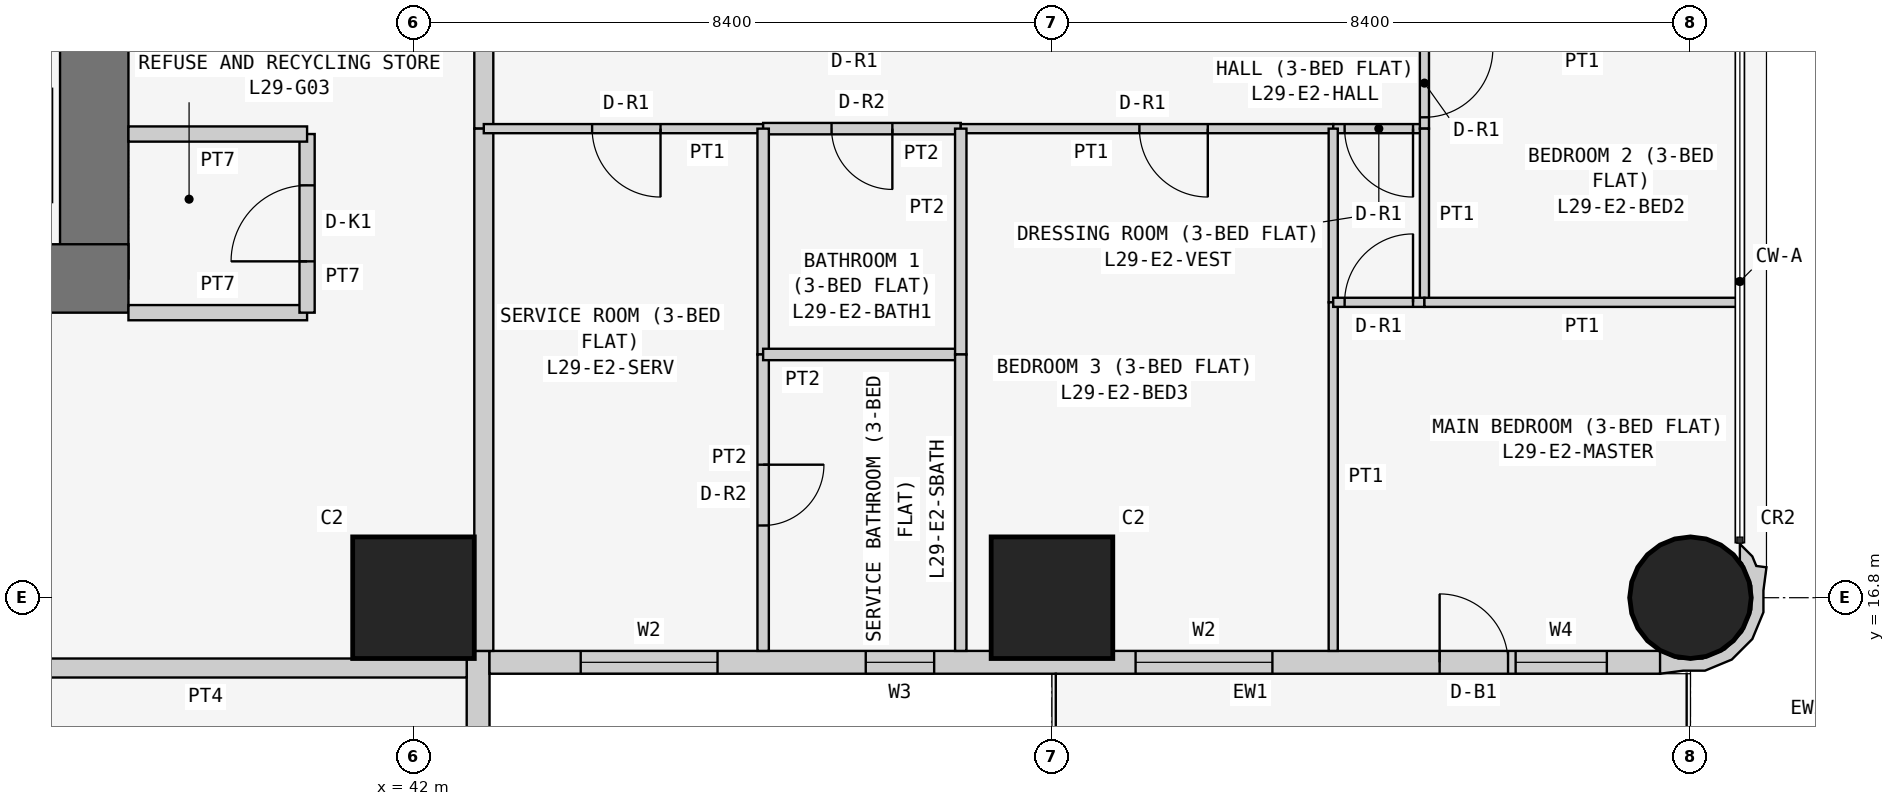
"""IFC4 building model, lengths in metres.
Left out: names, types, materials, properties, quantities, classifications, styles, units other than length and angle.
Written with IfcOpenShell. Run it as: python <this file> out.ifc"""

import sys

from ifc_helpers import new_model, si_unit, direction, frame, frame_2d, origin, origin_2d, place, context, subcontext, project, spatial, polyline, rectangle, circle, outline, extrude, element, fill, save


model = new_model("IFC4")
c1 = context("Model", 3, precision=1e-05, world=origin(), true_north=direction((0.0, 1.0)))
c2 = subcontext(c1, "Body", "Model", "MODEL_VIEW")
j1 = project(units=[si_unit("LENGTHUNIT", "METRE"), si_unit("PLANEANGLEUNIT", "RADIAN")], contexts=[c1])
p1 = place(None, origin())
s1 = spatial("IfcSite", under=j1, at=p1, CompositionType="ELEMENT")
p2 = place(p1, origin())
s2 = spatial("IfcBuilding", under=s1, at=p2, CompositionType="ELEMENT")
p3 = place(p2, frame((0.0, 0.0, 116.1)))
s3 = spatial("IfcBuildingStorey", under=s2, at=p3, CompositionType="ELEMENT", Elevation=116.1)
for number, where, z_axis, x_axis in (
    (1, (42.0, 16.8, 0.0), (0.0, 0.0, 1.0), (1.0, 0.0, 0.0)),
    (2, (50.4, 16.8, 0.0), (0.0, 0.0, 1.0), (1.0, 0.0, 0.0)),
):
    element("IfcColumn", number, at=place(p3, frame(where, z_axis=z_axis, x_axis=x_axis)), inside=s3, PredefinedType="COLUMN", context=c2, shape_type="SweptSolid", body=[
        extrude(rectangle(XDim=1.6, YDim=1.6, at=origin_2d()), origin(), (0.0, 0.0, 1.0), 3.6),
    ])
p4 = place(p3, frame((58.8, 16.8, 0.0), z_axis=(0.0, 0.0, 1.0), x_axis=(1.0, 0.0, 0.0)))
e3 = element("IfcColumn", 3, at=p4, inside=s3, PredefinedType="COLUMN", context=c2, shape_type="SweptSolid", body=[
    extrude(circle(Radius=0.8, at=origin_2d()), origin(), (0.0, 0.0, 1.0), 3.6),
])
p5 = place(p3, frame((21.0, 21.0, 0.0), z_axis=(0.0, 0.0, 1.0), x_axis=(1.0, 0.0, 0.0)))
e4 = element("IfcWall", 4, at=p5, inside=s3, PredefinedType="SHEAR", context=c2, shape_type="SweptSolid", body=[
    extrude(rectangle(XDim=17.25, YDim=0.9, at=frame_2d((8.625, 0.0))), origin(), (0.0, 0.0, 1.0), 3.6),
])
p6 = place(p3, frame((37.8, 21.0, 0.0), z_axis=(0.0, 0.0, 1.0), x_axis=(0.0, 1.0, 0.0)))
e5 = element("IfcWall", 5, at=p6, inside=s3, PredefinedType="SHEAR", context=c2, shape_type="SweptSolid", body=[
    extrude(rectangle(XDim=17.25, YDim=0.9, at=frame_2d((8.625, 0.0))), origin(), (0.0, 0.0, 1.0), 3.6),
])
p7 = place(p6, frame((5.2, 0.0, 0.0)))
e6 = element("IfcOpeningElement", 6, at=p7, cuts=e5, PredefinedType="OPENING", context=c2, shape_type="SweptSolid", body=[
    extrude(rectangle(XDim=1.2, YDim=2.1, at=frame_2d((0.6, 1.05))), frame((0.0, 0.46, 0.0), z_axis=(0.0, -1.0, 0.0), x_axis=(1.0, 0.0, 0.0)), (0.0, 0.0, 1.0), 0.92),
])
p8 = place(p3, frame((42.85, 8.8, 0.0), z_axis=(0.0, 0.0, 1.0), x_axis=(0.0, 1.0, 0.0)))
e7 = element("IfcWall", 7, at=p8, inside=s3, PredefinedType="SOLIDWALL", context=c2, shape_type="SweptSolid", body=[
    extrude(rectangle(XDim=7.3, YDim=0.3, at=frame_2d((3.65, 0.0))), origin(), (0.0, 0.0, 1.0), 3.45),
])
p9 = place(p8, frame((3.1, 0.0, 0.9)))
e8 = element("IfcOpeningElement", 8, at=p9, cuts=e7, PredefinedType="OPENING", context=c2, shape_type="SweptSolid", body=[
    extrude(rectangle(XDim=2.4, YDim=1.5, at=frame_2d((1.2, 0.75))), frame((0.0, 0.16, 0.0), z_axis=(0.0, -1.0, 0.0), x_axis=(1.0, 0.0, 0.0)), (0.0, 0.0, 1.0), 0.32),
])
p10 = place(p8, frame((0.75, 0.0, 0.9)))
e9 = element("IfcOpeningElement", 9, at=p10, cuts=e7, PredefinedType="OPENING", context=c2, shape_type="SweptSolid", body=[
    extrude(rectangle(XDim=1.2, YDim=1.5, at=frame_2d((0.6, 0.75))), frame((0.0, 0.16, 0.0), z_axis=(0.0, -1.0, 0.0), x_axis=(1.0, 0.0, 0.0)), (0.0, 0.0, 1.0), 0.32),
])
p11 = place(p3, frame((43.0, 15.95, 0.0), z_axis=(0.0, 0.0, 1.0), x_axis=(1.0, 0.0, 0.0)))
e10 = element("IfcWall", 10, at=p11, inside=s3, PredefinedType="SOLIDWALL", context=c2, shape_type="SweptSolid", body=[
    extrude(rectangle(XDim=15.4, YDim=0.3, at=frame_2d((7.7, 0.0))), origin(), (0.0, 0.0, 1.0), 3.45),
])
p12 = place(p11, frame((1.2, 0.0, 0.9)))
e11 = element("IfcOpeningElement", 11, at=p12, cuts=e10, PredefinedType="OPENING", context=c2, shape_type="SweptSolid", body=[
    extrude(rectangle(XDim=1.8, YDim=1.5, at=frame_2d((0.9, 0.75))), frame((0.0, 0.16, 0.0), z_axis=(0.0, -1.0, 0.0), x_axis=(1.0, 0.0, 0.0)), (0.0, 0.0, 1.0), 0.32),
])
p13 = place(p11, frame((4.95, 0.0, 1.5)))
e12 = element("IfcOpeningElement", 12, at=p13, cuts=e10, PredefinedType="OPENING", context=c2, shape_type="SweptSolid", body=[
    extrude(rectangle(XDim=0.9, YDim=0.7, at=frame_2d((0.45, 0.35))), frame((0.0, 0.16, 0.0), z_axis=(0.0, -1.0, 0.0), x_axis=(1.0, 0.0, 0.0)), (0.0, 0.0, 1.0), 0.32),
])
p14 = place(p11, frame((8.5, 0.0, 0.9)))
e13 = element("IfcOpeningElement", 13, at=p14, cuts=e10, PredefinedType="OPENING", context=c2, shape_type="SweptSolid", body=[
    extrude(rectangle(XDim=1.8, YDim=1.5, at=frame_2d((0.9, 0.75))), frame((0.0, 0.16, 0.0), z_axis=(0.0, -1.0, 0.0), x_axis=(1.0, 0.0, 0.0)), (0.0, 0.0, 1.0), 0.32),
])
p15 = place(p11, frame((12.5, 0.0, 0.0)))
e14 = element("IfcOpeningElement", 14, at=p15, cuts=e10, PredefinedType="OPENING", context=c2, shape_type="SweptSolid", body=[
    extrude(rectangle(XDim=0.9, YDim=2.4, at=frame_2d((0.45, 1.2))), frame((0.0, 0.16, 0.0), z_axis=(0.0, -1.0, 0.0), x_axis=(1.0, 0.0, 0.0)), (0.0, 0.0, 1.0), 0.32),
])
p16 = place(p11, frame((13.5, 0.0, 0.9)))
e15 = element("IfcOpeningElement", 15, at=p16, cuts=e10, PredefinedType="OPENING", context=c2, shape_type="SweptSolid", body=[
    extrude(rectangle(XDim=1.2, YDim=1.5, at=frame_2d((0.6, 0.75))), frame((0.0, 0.16, 0.0), z_axis=(0.0, -1.0, 0.0), x_axis=(1.0, 0.0, 0.0)), (0.0, 0.0, 1.0), 0.32),
])
p17 = place(p3, frame((58.473, 15.983, 0.0), z_axis=(0.0, 0.0, 1.0), x_axis=(0.93923434088, -0.343276641956, 0.0)))
e16 = element("IfcWall", 16, at=p17, inside=s3, PredefinedType="SOLIDWALL", context=c2, shape_type="SweptSolid", body=[
    extrude(outline(polyline([(0.828, 1.599), (0.697, 1.569), (0.604, 1.67), (0.394, 1.767), (0.471, 1.556), (0.508, 1.539), (0.724, 1.304), (0.834, 1.005), (0.82, 0.686), (0.686, 0.397), (0.451, 0.182), (0.152, 0.073), (-0.116, 0.084), (-0.127, 0.078), (-0.146, 0.071), (-0.006, -0.197), (0.266, -0.055), (0.535, 0.044), (0.817, 0.302), (0.978, 0.648), (0.994, 1.03), (0.895, 1.3), (0.828, 1.599)])), origin(), (0.0, 0.0, 1.0), 3.45),
])
p18 = place(p3, frame((38.25, 20.55, 0.0), z_axis=(0.0, 0.0, 1.0), x_axis=(1.0, 0.0, 0.0)))
e17 = element("IfcWall", 17, at=p18, inside=s3, PredefinedType="PARTITIONING", context=c2, shape_type="SweptSolid", body=[
    extrude(rectangle(XDim=2.35, YDim=0.2, at=frame_2d((1.175, 0.0))), origin(), (0.0, 0.0, 1.0), 3.45),
])
p19 = place(p3, frame((40.6, 20.55, 0.0), z_axis=(0.0, 0.0, 1.0), x_axis=(0.0, 1.0, 0.0)))
e18 = element("IfcWall", 18, at=p19, inside=s3, PredefinedType="PARTITIONING", context=c2, shape_type="SweptSolid", body=[
    extrude(rectangle(XDim=2.35, YDim=0.2, at=frame_2d((1.175, 0.0))), origin(), (0.0, 0.0, 1.0), 3.45),
])
p20 = place(p19, frame((0.675, 0.0, 0.0)))
e19 = element("IfcOpeningElement", 19, at=p20, cuts=e18, PredefinedType="OPENING", context=c2, shape_type="SweptSolid", body=[
    extrude(rectangle(XDim=1.0, YDim=2.1, at=frame_2d((0.5, 1.05))), frame((0.0, 0.11, 0.0), z_axis=(0.0, -1.0, 0.0), x_axis=(1.0, 0.0, 0.0)), (0.0, 0.0, 1.0), 0.22),
])
p21 = place(p3, frame((40.6, 22.9, 0.0), z_axis=(0.0, 0.0, 1.0), x_axis=(-1.0, 0.0, 0.0)))
e20 = element("IfcWall", 20, at=p21, inside=s3, PredefinedType="PARTITIONING", context=c2, shape_type="SweptSolid", body=[
    extrude(rectangle(XDim=2.35, YDim=0.2, at=frame_2d((1.175, 0.0))), origin(), (0.0, 0.0, 1.0), 3.45),
])
p22 = place(p3, frame((42.925, 24.171, 0.0), z_axis=(0.0, 0.0, 1.0), x_axis=(0.0, -1.0, 0.0)))
e21 = element("IfcWall", 21, at=p22, inside=s3, PredefinedType="PARTITIONING", context=c2, shape_type="SweptSolid", body=[
    extrude(rectangle(XDim=1.2, YDim=0.25, at=frame_2d((0.6, 0.0))), origin(), (0.0, 0.0, 1.0), 3.45),
])
for number, where, z_axis, x_axis in (
    (22, (42.925, 22.971, 0.0), (0.0, 0.0, 1.0), (0.0, -1.0, 0.0)),
    (23, (42.7, 15.875, 0.0), (0.0, 0.0, 1.0), (-1.0, 0.0, 0.0)),
):
    element("IfcWall", number, at=place(p3, frame(where, z_axis=z_axis, x_axis=x_axis)), inside=s3, PredefinedType="PARTITIONING", context=c2, shape_type="SweptSolid", body=[
        extrude(rectangle(XDim=6.871, YDim=0.25, at=frame_2d((3.436, 0.0))), origin(), (0.0, 0.0, 1.0), 3.45),
    ])
p23 = place(p3, frame((46.6, 22.971, 0.0), z_axis=(0.0, 0.0, 1.0), x_axis=(-1.0, 0.0, 0.0)))
e24 = element("IfcWall", 24, at=p23, inside=s3, PredefinedType="PARTITIONING", context=c2, shape_type="SweptSolid", body=[
    extrude(rectangle(XDim=3.675, YDim=0.12, at=frame_2d((1.837, 0.0))), origin(), (0.0, 0.0, 1.0), 3.45),
])
p24 = place(p23, frame((1.35, 0.0, 0.0)))
e25 = element("IfcOpeningElement", 25, at=p24, cuts=e24, PredefinedType="OPENING", context=c2, shape_type="SweptSolid", body=[
    extrude(rectangle(XDim=0.9, YDim=2.1, at=frame_2d((0.45, 1.05))), frame((0.0, 0.07, 0.0), z_axis=(0.0, -1.0, 0.0), x_axis=(1.0, 0.0, 0.0)), (0.0, 0.0, 1.0), 0.14),
])
p25 = place(p3, frame((49.2, 22.971, 0.0), z_axis=(0.0, 0.0, 1.0), x_axis=(-1.0, 0.0, 0.0)))
e26 = element("IfcWall", 26, at=p25, inside=s3, PredefinedType="PARTITIONING", context=c2, shape_type="SweptSolid", body=[
    extrude(rectangle(XDim=2.6, YDim=0.15, at=frame_2d((1.3, 0.0))), origin(), (0.0, 0.0, 1.0), 3.45),
])
p26 = place(p25, frame((0.9, 0.0, 0.0)))
e27 = element("IfcOpeningElement", 27, at=p26, cuts=e26, PredefinedType="OPENING", context=c2, shape_type="SweptSolid", body=[
    extrude(rectangle(XDim=0.8, YDim=2.1, at=frame_2d((0.4, 1.05))), frame((0.0, 0.085, 0.0), z_axis=(0.0, -1.0, 0.0), x_axis=(1.0, 0.0, 0.0)), (0.0, 0.0, 1.0), 0.17),
])
p27 = place(p3, frame((54.1, 22.971, 0.0), z_axis=(0.0, 0.0, 1.0), x_axis=(-1.0, 0.0, 0.0)))
e28 = element("IfcWall", 28, at=p27, inside=s3, PredefinedType="PARTITIONING", context=c2, shape_type="SweptSolid", body=[
    extrude(rectangle(XDim=4.9, YDim=0.12, at=frame_2d((2.45, 0.0))), origin(), (0.0, 0.0, 1.0), 3.45),
])
p28 = place(p27, frame((1.65, 0.0, 0.0)))
e29 = element("IfcOpeningElement", 29, at=p28, cuts=e28, PredefinedType="OPENING", context=c2, shape_type="SweptSolid", body=[
    extrude(rectangle(XDim=0.9, YDim=2.1, at=frame_2d((0.45, 1.05))), frame((0.0, 0.07, 0.0), z_axis=(0.0, -1.0, 0.0), x_axis=(1.0, 0.0, 0.0)), (0.0, 0.0, 1.0), 0.14),
])
p29 = place(p3, frame((55.3, 22.971, 0.0), z_axis=(0.0, 0.0, 1.0), x_axis=(-1.0, 0.0, 0.0)))
e30 = element("IfcWall", 30, at=p29, inside=s3, PredefinedType="PARTITIONING", context=c2, shape_type="SweptSolid", body=[
    extrude(rectangle(XDim=1.2, YDim=0.12, at=frame_2d((0.6, 0.0))), origin(), (0.0, 0.0, 1.0), 3.45),
])
p30 = place(p29, frame((0.15, 0.0, 0.0)))
e31 = element("IfcOpeningElement", 31, at=p30, cuts=e30, PredefinedType="OPENING", context=c2, shape_type="SweptSolid", body=[
    extrude(rectangle(XDim=0.9, YDim=2.1, at=frame_2d((0.45, 1.05))), frame((0.0, 0.07, 0.0), z_axis=(0.0, -1.0, 0.0), x_axis=(1.0, 0.0, 0.0)), (0.0, 0.0, 1.0), 0.14),
])
p31 = place(p3, frame((55.3, 24.171, 0.0), z_axis=(0.0, 0.0, 1.0), x_axis=(0.0, -1.0, 0.0)))
e32 = element("IfcWall", 32, at=p31, inside=s3, PredefinedType="PARTITIONING", context=c2, shape_type="SweptSolid", body=[
    extrude(rectangle(XDim=1.2, YDim=0.12, at=frame_2d((0.6, 0.0))), origin(), (0.0, 0.0, 1.0), 3.45),
])
p32 = place(p31, frame((0.151, 0.0, 0.0)))
e33 = element("IfcOpeningElement", 33, at=p32, cuts=e32, PredefinedType="OPENING", context=c2, shape_type="SweptSolid", body=[
    extrude(rectangle(XDim=0.9, YDim=2.1, at=frame_2d((0.45, 1.05))), frame((0.0, 0.07, 0.0), z_axis=(0.0, -1.0, 0.0), x_axis=(1.0, 0.0, 0.0)), (0.0, 0.0, 1.0), 0.14),
])
p33 = place(p3, frame((46.6, 22.971, 0.0), z_axis=(0.0, 0.0, 1.0), x_axis=(0.0, -1.0, 0.0)))
e34 = element("IfcWall", 34, at=p33, inside=s3, PredefinedType="PARTITIONING", context=c2, shape_type="SweptSolid", body=[
    extrude(rectangle(XDim=2.971, YDim=0.15, at=frame_2d((1.485, 0.0))), origin(), (0.0, 0.0, 1.0), 3.45),
])
p34 = place(p3, frame((46.6, 20.0, 0.0), z_axis=(0.0, 0.0, 1.0), x_axis=(0.0, -1.0, 0.0)))
e35 = element("IfcWall", 35, at=p34, inside=s3, PredefinedType="PARTITIONING", context=c2, shape_type="SweptSolid", body=[
    extrude(rectangle(XDim=3.9, YDim=0.15, at=frame_2d((1.95, 0.0))), origin(), (0.0, 0.0, 1.0), 3.45),
])
p35 = place(p34, frame((1.45, 0.0, 0.0)))
e36 = element("IfcOpeningElement", 36, at=p35, cuts=e35, PredefinedType="OPENING", context=c2, shape_type="SweptSolid", body=[
    extrude(rectangle(XDim=0.8, YDim=2.1, at=frame_2d((0.4, 1.05))), frame((0.0, 0.085, 0.0), z_axis=(0.0, -1.0, 0.0), x_axis=(1.0, 0.0, 0.0)), (0.0, 0.0, 1.0), 0.17),
])
p36 = place(p3, frame((49.2, 20.0, 0.0), z_axis=(0.0, 0.0, 1.0), x_axis=(-1.0, 0.0, 0.0)))
e37 = element("IfcWall", 37, at=p36, inside=s3, PredefinedType="PARTITIONING", context=c2, shape_type="SweptSolid", body=[
    extrude(rectangle(XDim=2.6, YDim=0.15, at=frame_2d((1.3, 0.0))), origin(), (0.0, 0.0, 1.0), 3.45),
])
p37 = place(p3, frame((49.2, 22.971, 0.0), z_axis=(0.0, 0.0, 1.0), x_axis=(0.0, -1.0, 0.0)))
e38 = element("IfcWall", 38, at=p37, inside=s3, PredefinedType="PARTITIONING", context=c2, shape_type="SweptSolid", body=[
    extrude(rectangle(XDim=2.971, YDim=0.15, at=frame_2d((1.485, 0.0))), origin(), (0.0, 0.0, 1.0), 3.45),
])
p38 = place(p3, frame((49.2, 20.0, 0.0), z_axis=(0.0, 0.0, 1.0), x_axis=(0.0, -1.0, 0.0)))
e39 = element("IfcWall", 39, at=p38, inside=s3, PredefinedType="PARTITIONING", context=c2, shape_type="SweptSolid", body=[
    extrude(rectangle(XDim=3.9, YDim=0.15, at=frame_2d((1.95, 0.0))), origin(), (0.0, 0.0, 1.0), 3.45),
])
p39 = place(p3, frame((54.1, 22.971, 0.0), z_axis=(0.0, 0.0, 1.0), x_axis=(0.0, -1.0, 0.0)))
e40 = element("IfcWall", 40, at=p39, inside=s3, PredefinedType="PARTITIONING", context=c2, shape_type="SweptSolid", body=[
    extrude(rectangle(XDim=2.285, YDim=0.12, at=frame_2d((1.143, 0.0))), origin(), (0.0, 0.0, 1.0), 3.45),
])
p40 = place(p3, frame((54.1, 20.686, 0.0), z_axis=(0.0, 0.0, 1.0), x_axis=(0.0, -1.0, 0.0)))
e41 = element("IfcWall", 41, at=p40, inside=s3, PredefinedType="PARTITIONING", context=c2, shape_type="SweptSolid", body=[
    extrude(rectangle(XDim=4.586, YDim=0.12, at=frame_2d((2.293, 0.0))), origin(), (0.0, 0.0, 1.0), 3.45),
])
p41 = place(p3, frame((55.3, 22.971, 0.0), z_axis=(0.0, 0.0, 1.0), x_axis=(0.0, -1.0, 0.0)))
e42 = element("IfcWall", 42, at=p41, inside=s3, PredefinedType="PARTITIONING", context=c2, shape_type="SweptSolid", body=[
    extrude(rectangle(XDim=2.285, YDim=0.12, at=frame_2d((1.143, 0.0))), origin(), (0.0, 0.0, 1.0), 3.45),
])
p42 = place(p3, frame((55.3, 20.686, 0.0), z_axis=(0.0, 0.0, 1.0), x_axis=(-1.0, 0.0, 0.0)))
e43 = element("IfcWall", 43, at=p42, inside=s3, PredefinedType="PARTITIONING", context=c2, shape_type="SweptSolid", body=[
    extrude(rectangle(XDim=1.2, YDim=0.12, at=frame_2d((0.6, 0.0))), origin(), (0.0, 0.0, 1.0), 3.45),
])
p43 = place(p42, frame((0.15, 0.0, 0.0)))
e44 = element("IfcOpeningElement", 44, at=p43, cuts=e43, PredefinedType="OPENING", context=c2, shape_type="SweptSolid", body=[
    extrude(rectangle(XDim=0.9, YDim=2.1, at=frame_2d((0.45, 1.05))), frame((0.0, 0.07, 0.0), z_axis=(0.0, -1.0, 0.0), x_axis=(1.0, 0.0, 0.0)), (0.0, 0.0, 1.0), 0.14),
])
p44 = place(p3, frame((59.45, 20.686, 0.0), z_axis=(0.0, 0.0, 1.0), x_axis=(-1.0, 0.0, 0.0)))
e45 = element("IfcWall", 45, at=p44, inside=s3, PredefinedType="PARTITIONING", context=c2, shape_type="SweptSolid", body=[
    extrude(rectangle(XDim=4.15, YDim=0.12, at=frame_2d((2.075, 0.0))), origin(), (0.0, 0.0, 1.0), 3.45),
])
p45 = place(p12, origin())
e46 = element("IfcWindow", 46, at=p45, inside=s3, PartitioningType="SINGLE_PANEL", PredefinedType="WINDOW", context=c2, shape_type="SweptSolid", body=[
    extrude(rectangle(XDim=1.8, YDim=1.5, at=frame_2d((0.9, 0.75))), frame((0.0, 0.03, 0.0), z_axis=(0.0, -1.0, 0.0), x_axis=(1.0, 0.0, 0.0)), (0.0, 0.0, 1.0), 0.06),
])
fill(e11, e46)
p46 = place(p13, origin())
e47 = element("IfcWindow", 47, at=p46, inside=s3, PartitioningType="SINGLE_PANEL", PredefinedType="WINDOW", context=c2, shape_type="SweptSolid", body=[
    extrude(rectangle(XDim=0.9, YDim=0.7, at=frame_2d((0.45, 0.35))), frame((0.0, 0.03, 0.0), z_axis=(0.0, -1.0, 0.0), x_axis=(1.0, 0.0, 0.0)), (0.0, 0.0, 1.0), 0.06),
])
fill(e12, e47)
p47 = place(p14, origin())
e48 = element("IfcWindow", 48, at=p47, inside=s3, PartitioningType="SINGLE_PANEL", PredefinedType="WINDOW", context=c2, shape_type="SweptSolid", body=[
    extrude(rectangle(XDim=1.8, YDim=1.5, at=frame_2d((0.9, 0.75))), frame((0.0, 0.03, 0.0), z_axis=(0.0, -1.0, 0.0), x_axis=(1.0, 0.0, 0.0)), (0.0, 0.0, 1.0), 0.06),
])
fill(e13, e48)
p48 = place(p15, origin())
e49 = element("IfcDoor", 49, at=p48, inside=s3, OperationType="SINGLE_SWING_LEFT", PredefinedType="DOOR", context=c2, shape_type="SweptSolid", body=[
    extrude(rectangle(XDim=0.9, YDim=2.4, at=frame_2d((0.45, 1.2))), frame((0.0, 0.025, 0.0), z_axis=(0.0, -1.0, 0.0), x_axis=(1.0, 0.0, 0.0)), (0.0, 0.0, 1.0), 0.05),
])
fill(e14, e49)
p49 = place(p16, origin())
e50 = element("IfcWindow", 50, at=p49, inside=s3, PartitioningType="SINGLE_PANEL", PredefinedType="WINDOW", context=c2, shape_type="SweptSolid", body=[
    extrude(rectangle(XDim=1.2, YDim=1.5, at=frame_2d((0.6, 0.75))), frame((0.0, 0.03, 0.0), z_axis=(0.0, -1.0, 0.0), x_axis=(1.0, 0.0, 0.0)), (0.0, 0.0, 1.0), 0.06),
])
fill(e15, e50)
p50 = place(p20, origin())
e51 = element("IfcDoor", 51, at=p50, inside=s3, OperationType="SINGLE_SWING_LEFT", PredefinedType="DOOR", context=c2, shape_type="SweptSolid", body=[
    extrude(rectangle(XDim=1.0, YDim=2.1, at=frame_2d((0.5, 1.05))), frame((0.0, 0.025, 0.0), z_axis=(0.0, -1.0, 0.0), x_axis=(1.0, 0.0, 0.0)), (0.0, 0.0, 1.0), 0.05),
])
fill(e19, e51)
p51 = place(p24, origin())
e52 = element("IfcDoor", 52, at=p51, inside=s3, OperationType="SINGLE_SWING_LEFT", PredefinedType="DOOR", context=c2, shape_type="SweptSolid", body=[
    extrude(rectangle(XDim=0.9, YDim=2.1, at=frame_2d((0.45, 1.05))), frame((0.0, 0.025, 0.0), z_axis=(0.0, -1.0, 0.0), x_axis=(1.0, 0.0, 0.0)), (0.0, 0.0, 1.0), 0.05),
])
fill(e25, e52)
p52 = place(p35, origin())
e53 = element("IfcDoor", 53, at=p52, inside=s3, OperationType="SINGLE_SWING_LEFT", PredefinedType="DOOR", context=c2, shape_type="SweptSolid", body=[
    extrude(rectangle(XDim=0.8, YDim=2.1, at=frame_2d((0.4, 1.05))), frame((0.0, 0.025, 0.0), z_axis=(0.0, -1.0, 0.0), x_axis=(1.0, 0.0, 0.0)), (0.0, 0.0, 1.0), 0.05),
])
fill(e36, e53)
p53 = place(p26, origin())
e54 = element("IfcDoor", 54, at=p53, inside=s3, OperationType="SINGLE_SWING_LEFT", PredefinedType="DOOR", context=c2, shape_type="SweptSolid", body=[
    extrude(rectangle(XDim=0.8, YDim=2.1, at=frame_2d((0.4, 1.05))), frame((0.0, 0.025, 0.0), z_axis=(0.0, -1.0, 0.0), x_axis=(1.0, 0.0, 0.0)), (0.0, 0.0, 1.0), 0.05),
])
fill(e27, e54)
p54 = place(p28, origin())
e55 = element("IfcDoor", 55, at=p54, inside=s3, OperationType="SINGLE_SWING_LEFT", PredefinedType="DOOR", context=c2, shape_type="SweptSolid", body=[
    extrude(rectangle(XDim=0.9, YDim=2.1, at=frame_2d((0.45, 1.05))), frame((0.0, 0.025, 0.0), z_axis=(0.0, -1.0, 0.0), x_axis=(1.0, 0.0, 0.0)), (0.0, 0.0, 1.0), 0.05),
])
fill(e29, e55)
p55 = place(p30, origin())
e56 = element("IfcDoor", 56, at=p55, inside=s3, OperationType="SINGLE_SWING_LEFT", PredefinedType="DOOR", context=c2, shape_type="SweptSolid", body=[
    extrude(rectangle(XDim=0.9, YDim=2.1, at=frame_2d((0.45, 1.05))), frame((0.0, 0.025, 0.0), z_axis=(0.0, -1.0, 0.0), x_axis=(1.0, 0.0, 0.0)), (0.0, 0.0, 1.0), 0.05),
])
fill(e31, e56)
p56 = place(p43, frame((0.9, 0.0, 0.0), z_axis=(0.0, 0.0, 1.0), x_axis=(-1.0, 0.0, 0.0)))
e57 = element("IfcDoor", 57, at=p56, inside=s3, OperationType="SINGLE_SWING_RIGHT", PredefinedType="DOOR", context=c2, shape_type="SweptSolid", body=[
    extrude(rectangle(XDim=0.9, YDim=2.1, at=frame_2d((0.45, 1.05))), frame((0.0, 0.025, 0.0), z_axis=(0.0, -1.0, 0.0), x_axis=(1.0, 0.0, 0.0)), (0.0, 0.0, 1.0), 0.05),
])
fill(e44, e57)
p57 = place(p32, origin())
e58 = element("IfcDoor", 58, at=p57, inside=s3, OperationType="SINGLE_SWING_LEFT", PredefinedType="DOOR", context=c2, shape_type="SweptSolid", body=[
    extrude(rectangle(XDim=0.9, YDim=2.1, at=frame_2d((0.45, 1.05))), frame((0.0, 0.025, 0.0), z_axis=(0.0, -1.0, 0.0), x_axis=(1.0, 0.0, 0.0)), (0.0, 0.0, 1.0), 0.05),
])
fill(e33, e58)
save(model, sys.argv[1])
